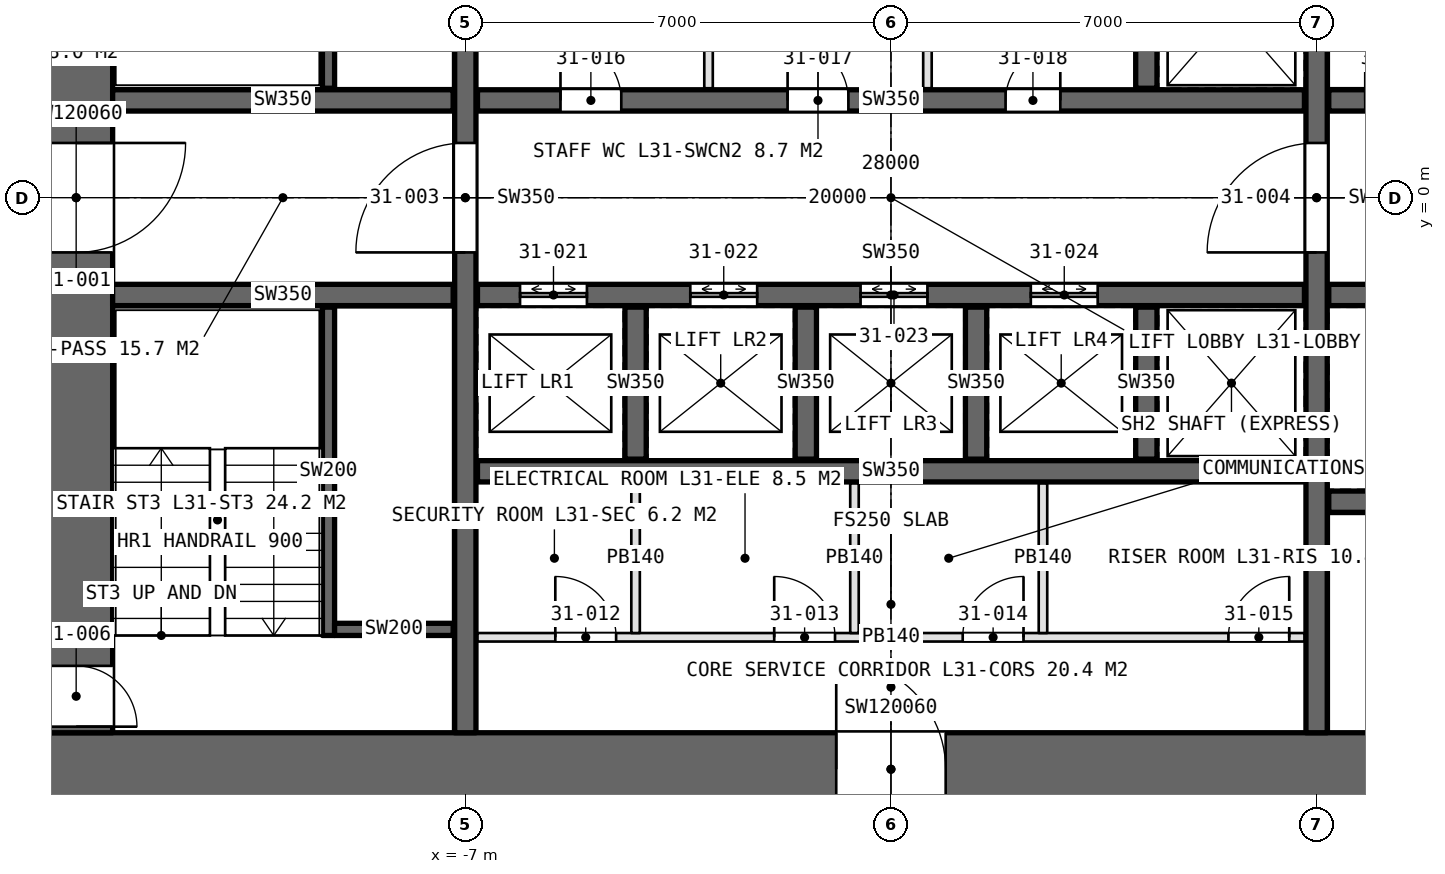
"""IFC4 building model, lengths in metres.
Left out: names, types, materials, properties, quantities, classifications, styles, units other than length and angle.
Written with IfcOpenShell. Run it as: python <this file> out.ifc"""

import sys

from ifc_helpers import new_model, si_unit, direction, frame, frame_2d, origin, place, context, subcontext, project, spatial, rectangle, extrude, element, fill, save


model = new_model("IFC4")
c1 = context("Model", 3, precision=1e-05, world=origin(), true_north=direction((0.0, 1.0)))
c2 = subcontext(c1, "Body", "Model", "MODEL_VIEW")
j1 = project(units=[si_unit("LENGTHUNIT", "METRE"), si_unit("PLANEANGLEUNIT", "RADIAN")], contexts=[c1])
p1 = place(None, origin())
s1 = spatial("IfcSite", under=j1, at=p1, CompositionType="ELEMENT")
p2 = place(p1, origin())
s2 = spatial("IfcBuilding", under=s1, at=p2, CompositionType="ELEMENT")
p3 = place(p2, frame((0.0, 0.0, 147.0)))
s3 = spatial("IfcBuildingStorey", under=s2, at=p3, CompositionType="ELEMENT", Elevation=147.0)
p4 = place(p3, frame((-14.0, -9.4, 0.0), z_axis=(0.0, 0.0, 1.0), x_axis=(1.0, 0.0, 0.0)))
e1 = element("IfcWall", 1, at=p4, inside=s3, PredefinedType="SHEAR", context=c2, shape_type="SweptSolid", body=[
    extrude(rectangle(XDim=28.0, YDim=1.2, at=frame_2d((14.0, 0.0))), origin(), (0.0, 0.0, 1.0), 4.2),
])
p5 = place(p4, frame((13.1, 0.0, 0.0)))
e2 = element("IfcOpeningElement", 2, at=p5, cuts=e1, PredefinedType="OPENING", context=c2, shape_type="SweptSolid", body=[
    extrude(rectangle(XDim=1.8, YDim=2.4, at=frame_2d((0.9, 1.2))), frame((0.0, 0.61, 0.0), z_axis=(0.0, -1.0, 0.0), x_axis=(1.0, 0.0, 0.0)), (0.0, 0.0, 1.0), 1.22),
])
p6 = place(p4, frame((22.9, 0.0, 0.0)))
e3 = element("IfcOpeningElement", 3, at=p6, cuts=e1, PredefinedType="OPENING", context=c2, shape_type="SweptSolid", body=[
    extrude(rectangle(XDim=2.2, YDim=2.7, at=frame_2d((1.1, 1.35))), frame((0.0, 0.61, 0.0), z_axis=(0.0, -1.0, 0.0), x_axis=(1.0, 0.0, 0.0)), (0.0, 0.0, 1.0), 1.22),
])
p7 = place(p3, frame((-13.4, 8.8, 0.0), z_axis=(0.0, 0.0, 1.0), x_axis=(0.0, -1.0, 0.0)))
e4 = element("IfcWall", 4, at=p7, inside=s3, PredefinedType="SHEAR", context=c2, shape_type="SweptSolid", body=[
    extrude(rectangle(XDim=17.6, YDim=1.2, at=frame_2d((8.8, 0.0))), origin(), (0.0, 0.0, 1.0), 4.2),
])
p8 = place(p7, frame((7.9, 0.0, 0.0)))
e5 = element("IfcOpeningElement", 5, at=p8, cuts=e4, PredefinedType="OPENING", context=c2, shape_type="SweptSolid", body=[
    extrude(rectangle(XDim=1.8, YDim=2.4, at=frame_2d((0.9, 1.2))), frame((0.0, 0.61, 0.0), z_axis=(0.0, -1.0, 0.0), x_axis=(1.0, 0.0, 0.0)), (0.0, 0.0, 1.0), 1.22),
])
p9 = place(p7, frame((16.5, 0.0, 0.0)))
e6 = element("IfcOpeningElement", 6, at=p9, cuts=e4, PredefinedType="OPENING", context=c2, shape_type="SweptSolid", body=[
    extrude(rectangle(XDim=1.0, YDim=2.4, at=frame_2d((0.5, 1.2))), frame((0.0, 0.61, 0.0), z_axis=(0.0, -1.0, 0.0), x_axis=(1.0, 0.0, 0.0)), (0.0, 0.0, 1.0), 1.22),
])
p10 = place(p3, frame((-7.0, -8.8, 0.0), z_axis=(0.0, 0.0, 1.0), x_axis=(0.0, 1.0, 0.0)))
e7 = element("IfcWall", 7, at=p10, inside=s3, PredefinedType="SHEAR", context=c2, shape_type="SweptSolid", body=[
    extrude(rectangle(XDim=17.6, YDim=0.35, at=frame_2d((8.8, 0.0))), origin(), (0.0, 0.0, 1.0), 4.2),
])
p11 = place(p10, frame((7.9, 0.0, 0.0)))
e8 = element("IfcOpeningElement", 8, at=p11, cuts=e7, PredefinedType="OPENING", context=c2, shape_type="SweptSolid", body=[
    extrude(rectangle(XDim=1.8, YDim=2.4, at=frame_2d((0.9, 1.2))), frame((0.0, 0.185, 0.0), z_axis=(0.0, -1.0, 0.0), x_axis=(1.0, 0.0, 0.0)), (0.0, 0.0, 1.0), 0.37),
])
p12 = place(p3, frame((7.0, -8.8, 0.0), z_axis=(0.0, 0.0, 1.0), x_axis=(0.0, 1.0, 0.0)))
e9 = element("IfcWall", 9, at=p12, inside=s3, PredefinedType="SHEAR", context=c2, shape_type="SweptSolid", body=[
    extrude(rectangle(XDim=17.6, YDim=0.35, at=frame_2d((8.8, 0.0))), origin(), (0.0, 0.0, 1.0), 4.2),
])
p13 = place(p12, frame((7.9, 0.0, 0.0)))
e10 = element("IfcOpeningElement", 10, at=p13, cuts=e9, PredefinedType="OPENING", context=c2, shape_type="SweptSolid", body=[
    extrude(rectangle(XDim=1.8, YDim=2.4, at=frame_2d((0.9, 1.2))), frame((0.0, 0.185, 0.0), z_axis=(0.0, -1.0, 0.0), x_axis=(1.0, 0.0, 0.0)), (0.0, 0.0, 1.0), 0.37),
])
p14 = place(p3, frame((-6.8, 1.6, 0.0), z_axis=(0.0, 0.0, 1.0), x_axis=(1.0, 0.0, 0.0)))
e11 = element("IfcWall", 11, at=p14, inside=s3, PredefinedType="SHEAR", context=c2, shape_type="SweptSolid", body=[
    extrude(rectangle(XDim=13.6, YDim=0.35, at=frame_2d((6.8, 0.0))), origin(), (0.0, 0.0, 1.0), 4.2),
])
p15 = place(p14, frame((1.365, 0.0, 0.0)))
e12 = element("IfcOpeningElement", 12, at=p15, cuts=e11, PredefinedType="OPENING", context=c2, shape_type="SweptSolid", body=[
    extrude(rectangle(XDim=1.0, YDim=2.4, at=frame_2d((0.5, 1.2))), frame((0.0, 0.185, 0.0), z_axis=(0.0, -1.0, 0.0), x_axis=(1.0, 0.0, 0.0)), (0.0, 0.0, 1.0), 0.37),
])
p16 = place(p14, frame((5.1, 0.0, 0.0)))
e13 = element("IfcOpeningElement", 13, at=p16, cuts=e11, PredefinedType="OPENING", context=c2, shape_type="SweptSolid", body=[
    extrude(rectangle(XDim=1.0, YDim=2.4, at=frame_2d((0.5, 1.2))), frame((0.0, 0.185, 0.0), z_axis=(0.0, -1.0, 0.0), x_axis=(1.0, 0.0, 0.0)), (0.0, 0.0, 1.0), 0.37),
])
p17 = place(p14, frame((8.685, 0.0, 0.0)))
e14 = element("IfcOpeningElement", 14, at=p17, cuts=e11, PredefinedType="OPENING", context=c2, shape_type="SweptSolid", body=[
    extrude(rectangle(XDim=0.9, YDim=2.4, at=frame_2d((0.45, 1.2))), frame((0.0, 0.185, 0.0), z_axis=(0.0, -1.0, 0.0), x_axis=(1.0, 0.0, 0.0)), (0.0, 0.0, 1.0), 0.37),
])
p18 = place(p3, frame((-6.8, -1.6, 0.0), z_axis=(0.0, 0.0, 1.0), x_axis=(1.0, 0.0, 0.0)))
e15 = element("IfcWall", 15, at=p18, inside=s3, PredefinedType="SHEAR", context=c2, shape_type="SweptSolid", body=[
    extrude(rectangle(XDim=13.6, YDim=0.35, at=frame_2d((6.8, 0.0))), origin(), (0.0, 0.0, 1.0), 4.2),
])
p19 = place(p18, frame((0.7, 0.0, 0.0)))
e16 = element("IfcOpeningElement", 16, at=p19, cuts=e15, PredefinedType="OPENING", context=c2, shape_type="SweptSolid", body=[
    extrude(rectangle(XDim=1.1, YDim=2.4, at=frame_2d((0.55, 1.2))), frame((0.0, 0.185, 0.0), z_axis=(0.0, -1.0, 0.0), x_axis=(1.0, 0.0, 0.0)), (0.0, 0.0, 1.0), 0.37),
])
p20 = place(p18, frame((3.5, 0.0, 0.0)))
e17 = element("IfcOpeningElement", 17, at=p20, cuts=e15, PredefinedType="OPENING", context=c2, shape_type="SweptSolid", body=[
    extrude(rectangle(XDim=1.1, YDim=2.4, at=frame_2d((0.55, 1.2))), frame((0.0, 0.185, 0.0), z_axis=(0.0, -1.0, 0.0), x_axis=(1.0, 0.0, 0.0)), (0.0, 0.0, 1.0), 0.37),
])
p21 = place(p18, frame((6.3, 0.0, 0.0)))
e18 = element("IfcOpeningElement", 18, at=p21, cuts=e15, PredefinedType="OPENING", context=c2, shape_type="SweptSolid", body=[
    extrude(rectangle(XDim=1.1, YDim=2.4, at=frame_2d((0.55, 1.2))), frame((0.0, 0.185, 0.0), z_axis=(0.0, -1.0, 0.0), x_axis=(1.0, 0.0, 0.0)), (0.0, 0.0, 1.0), 0.37),
])
p22 = place(p18, frame((9.1, 0.0, 0.0)))
e19 = element("IfcOpeningElement", 19, at=p22, cuts=e15, PredefinedType="OPENING", context=c2, shape_type="SweptSolid", body=[
    extrude(rectangle(XDim=1.1, YDim=2.4, at=frame_2d((0.55, 1.2))), frame((0.0, 0.185, 0.0), z_axis=(0.0, -1.0, 0.0), x_axis=(1.0, 0.0, 0.0)), (0.0, 0.0, 1.0), 0.37),
])
p23 = place(p3, frame((-6.8, -4.5, 0.0), z_axis=(0.0, 0.0, 1.0), x_axis=(1.0, 0.0, 0.0)))
e20 = element("IfcWall", 20, at=p23, inside=s3, PredefinedType="SHEAR", context=c2, shape_type="SweptSolid", body=[
    extrude(rectangle(XDim=13.6, YDim=0.35, at=frame_2d((6.8, 0.0))), origin(), (0.0, 0.0, 1.0), 4.2),
])
for number, where, z_axis, x_axis in (
    (21, (-12.8, 1.6, 0.0), (0.0, 0.0, 1.0), (1.0, 0.0, 0.0)),
    (22, (-12.8, -1.6, 0.0), (0.0, 0.0, 1.0), (1.0, 0.0, 0.0)),
):
    element("IfcWall", number, at=place(p3, frame(where, z_axis=z_axis, x_axis=x_axis)), inside=s3, PredefinedType="SHEAR", context=c2, shape_type="SweptSolid", body=[
        extrude(rectangle(XDim=5.6, YDim=0.35, at=frame_2d((2.8, 0.0))), origin(), (0.0, 0.0, 1.0), 4.2),
    ])
p24 = place(p3, frame((7.2, 1.6, 0.0), z_axis=(0.0, 0.0, 1.0), x_axis=(1.0, 0.0, 0.0)))
e23 = element("IfcWall", 23, at=p24, inside=s3, PredefinedType="SHEAR", context=c2, shape_type="SweptSolid", body=[
    extrude(rectangle(XDim=5.6, YDim=0.35, at=frame_2d((2.8, 0.0))), origin(), (0.0, 0.0, 1.0), 4.2),
])
p25 = place(p24, frame((0.6, 0.0, 0.0)))
e24 = element("IfcOpeningElement", 24, at=p25, cuts=e23, PredefinedType="OPENING", context=c2, shape_type="SweptSolid", body=[
    extrude(rectangle(XDim=1.0, YDim=2.4, at=frame_2d((0.5, 1.2))), frame((0.0, 0.185, 0.0), z_axis=(0.0, -1.0, 0.0), x_axis=(1.0, 0.0, 0.0)), (0.0, 0.0, 1.0), 0.37),
])
p26 = place(p3, frame((7.2, -1.6, 0.0), z_axis=(0.0, 0.0, 1.0), x_axis=(1.0, 0.0, 0.0)))
e25 = element("IfcWall", 25, at=p26, inside=s3, PredefinedType="SHEAR", context=c2, shape_type="SweptSolid", body=[
    extrude(rectangle(XDim=5.6, YDim=0.35, at=frame_2d((2.8, 0.0))), origin(), (0.0, 0.0, 1.0), 4.2),
])
p27 = place(p26, frame((0.9, 0.0, 0.0)))
e26 = element("IfcOpeningElement", 26, at=p27, cuts=e25, PredefinedType="OPENING", context=c2, shape_type="SweptSolid", body=[
    extrude(rectangle(XDim=1.3, YDim=2.4, at=frame_2d((0.65, 1.2))), frame((0.0, 0.185, 0.0), z_axis=(0.0, -1.0, 0.0), x_axis=(1.0, 0.0, 0.0)), (0.0, 0.0, 1.0), 0.37),
])
p28 = place(p26, frame((3.9, 0.0, 0.0)))
e27 = element("IfcOpeningElement", 27, at=p28, cuts=e25, PredefinedType="OPENING", context=c2, shape_type="SweptSolid", body=[
    extrude(rectangle(XDim=1.3, YDim=2.4, at=frame_2d((0.65, 1.2))), frame((0.0, 0.185, 0.0), z_axis=(0.0, -1.0, 0.0), x_axis=(1.0, 0.0, 0.0)), (0.0, 0.0, 1.0), 0.37),
])
p29 = place(p3, frame((7.2, -5.0, 0.0), z_axis=(0.0, 0.0, 1.0), x_axis=(1.0, 0.0, 0.0)))
e28 = element("IfcWall", 28, at=p29, inside=s3, PredefinedType="SHEAR", context=c2, shape_type="SweptSolid", body=[
    extrude(rectangle(XDim=5.6, YDim=0.35, at=frame_2d((2.8, 0.0))), origin(), (0.0, 0.0, 1.0), 4.2),
])
for number, where, z_axis, x_axis in (
    (29, (-4.2, -4.3, 0.0), (0.0, 0.0, 1.0), (0.0, 1.0, 0.0)),
    (30, (-1.4, -4.3, 0.0), (0.0, 0.0, 1.0), (0.0, 1.0, 0.0)),
    (31, (1.4, -4.3, 0.0), (0.0, 0.0, 1.0), (0.0, 1.0, 0.0)),
    (32, (4.2, 1.8, 0.0), (0.0, 0.0, 1.0), (0.0, 1.0, 0.0)),
    (33, (4.2, -4.3, 0.0), (0.0, 0.0, 1.0), (0.0, 1.0, 0.0)),
):
    element("IfcWall", number, at=place(p3, frame(where, z_axis=z_axis, x_axis=x_axis)), inside=s3, PredefinedType="SHEAR", context=c2, shape_type="SweptSolid", body=[
        extrude(rectangle(XDim=2.5, YDim=0.35, at=frame_2d((1.25, 0.0))), origin(), (0.0, 0.0, 1.0), 4.2),
    ])
p30 = place(p3, frame((-6.8, -7.23, 0.0), z_axis=(0.0, 0.0, 1.0), x_axis=(1.0, 0.0, 0.0)))
e34 = element("IfcWall", 34, at=p30, inside=s3, PredefinedType="PARTITIONING", context=c2, shape_type="SweptSolid", body=[
    extrude(rectangle(XDim=13.6, YDim=0.14, at=frame_2d((6.8, 0.0))), origin(), (0.0, 0.0, 1.0), 3.95),
])
p31 = place(p30, frame((1.28, 0.0, 0.0)))
e35 = element("IfcOpeningElement", 35, at=p31, cuts=e34, PredefinedType="OPENING", context=c2, shape_type="SweptSolid", body=[
    extrude(rectangle(XDim=1.0, YDim=2.4, at=frame_2d((0.5, 1.2))), frame((0.0, 0.08, 0.0), z_axis=(0.0, -1.0, 0.0), x_axis=(1.0, 0.0, 0.0)), (0.0, 0.0, 1.0), 0.16),
])
p32 = place(p30, frame((4.88, 0.0, 0.0)))
e36 = element("IfcOpeningElement", 36, at=p32, cuts=e34, PredefinedType="OPENING", context=c2, shape_type="SweptSolid", body=[
    extrude(rectangle(XDim=1.0, YDim=2.4, at=frame_2d((0.5, 1.2))), frame((0.0, 0.08, 0.0), z_axis=(0.0, -1.0, 0.0), x_axis=(1.0, 0.0, 0.0)), (0.0, 0.0, 1.0), 0.16),
])
p33 = place(p30, frame((7.98, 0.0, 0.0)))
e37 = element("IfcOpeningElement", 37, at=p33, cuts=e34, PredefinedType="OPENING", context=c2, shape_type="SweptSolid", body=[
    extrude(rectangle(XDim=1.0, YDim=2.4, at=frame_2d((0.5, 1.2))), frame((0.0, 0.08, 0.0), z_axis=(0.0, -1.0, 0.0), x_axis=(1.0, 0.0, 0.0)), (0.0, 0.0, 1.0), 0.16),
])
p34 = place(p30, frame((12.35, 0.0, 0.0)))
e38 = element("IfcOpeningElement", 38, at=p34, cuts=e34, PredefinedType="OPENING", context=c2, shape_type="SweptSolid", body=[
    extrude(rectangle(XDim=1.0, YDim=2.4, at=frame_2d((0.5, 1.2))), frame((0.0, 0.08, 0.0), z_axis=(0.0, -1.0, 0.0), x_axis=(1.0, 0.0, 0.0)), (0.0, 0.0, 1.0), 0.16),
])
for number, where, z_axis, x_axis in (
    (39, (-4.2, -4.7, 0.0), (0.0, 0.0, 1.0), (0.0, -1.0, 0.0)),
    (40, (-0.6, -4.7, 0.0), (0.0, 0.0, 1.0), (0.0, -1.0, 0.0)),
    (41, (2.5, -4.7, 0.0), (0.0, 0.0, 1.0), (0.0, -1.0, 0.0)),
):
    element("IfcWall", number, at=place(p3, frame(where, z_axis=z_axis, x_axis=x_axis)), inside=s3, PredefinedType="PARTITIONING", context=c2, shape_type="SweptSolid", body=[
        extrude(rectangle(XDim=2.46, YDim=0.14, at=frame_2d((1.23, 0.0))), origin(), (0.0, 0.0, 1.0), 3.95),
    ])
for number, where, z_axis, x_axis in (
    (42, (-3.0, 1.8, 0.0), (0.0, 0.0, 1.0), (0.0, 1.0, 0.0)),
    (43, (0.6, 1.8, 0.0), (0.0, 0.0, 1.0), (0.0, 1.0, 0.0)),
):
    element("IfcWall", number, at=place(p3, frame(where, z_axis=z_axis, x_axis=x_axis)), inside=s3, PredefinedType="PARTITIONING", context=c2, shape_type="SweptSolid", body=[
        extrude(rectangle(XDim=2.5, YDim=0.14, at=frame_2d((1.25, 0.0))), origin(), (0.0, 0.0, 1.0), 3.95),
    ])
for number, where, z_axis, x_axis in (
    (44, (-9.25, 7.2, 0.0), (0.0, 0.0, 1.0), (0.0, -1.0, 0.0)),
    (45, (-9.25, -7.2, 0.0), (0.0, 0.0, 1.0), (0.0, 1.0, 0.0)),
):
    element("IfcWall", number, at=place(p3, frame(where, z_axis=z_axis, x_axis=x_axis)), inside=s3, PredefinedType="SOLIDWALL", context=c2, shape_type="SweptSolid", body=[
        extrude(rectangle(XDim=5.4, YDim=0.2, at=frame_2d((2.7, 0.0))), origin(), (0.0, 0.0, 1.0), 4.2),
    ])
p35 = place(p3, frame((-9.15, -7.1, 0.0), z_axis=(0.0, 0.0, 1.0), x_axis=(1.0, 0.0, 0.0)))
e46 = element("IfcWall", 46, at=p35, inside=s3, PredefinedType="SOLIDWALL", context=c2, shape_type="SweptSolid", body=[
    extrude(rectangle(XDim=1.95, YDim=0.2, at=frame_2d((0.975, 0.0))), origin(), (0.0, 0.0, 1.0), 4.2),
])
p36 = place(p8, origin())
e47 = element("IfcDoor", 47, at=p36, inside=s3, OperationType="DOUBLE_DOOR_SINGLE_SWING", PredefinedType="DOOR", context=c2, shape_type="SweptSolid", body=[
    extrude(rectangle(XDim=1.8, YDim=2.4, at=frame_2d((0.9, 1.2))), frame((0.0, 0.025, 0.0), z_axis=(0.0, -1.0, 0.0), x_axis=(1.0, 0.0, 0.0)), (0.0, 0.0, 1.0), 0.05),
])
fill(e5, e47)
p37 = place(p11, origin())
e48 = element("IfcDoor", 48, at=p37, inside=s3, OperationType="DOUBLE_DOOR_SINGLE_SWING", PredefinedType="DOOR", context=c2, shape_type="SweptSolid", body=[
    extrude(rectangle(XDim=1.8, YDim=2.4, at=frame_2d((0.9, 1.2))), frame((0.0, 0.025, 0.0), z_axis=(0.0, -1.0, 0.0), x_axis=(1.0, 0.0, 0.0)), (0.0, 0.0, 1.0), 0.05),
])
fill(e8, e48)
p38 = place(p13, origin())
e49 = element("IfcDoor", 49, at=p38, inside=s3, OperationType="DOUBLE_DOOR_SINGLE_SWING", PredefinedType="DOOR", context=c2, shape_type="SweptSolid", body=[
    extrude(rectangle(XDim=1.8, YDim=2.4, at=frame_2d((0.9, 1.2))), frame((0.0, 0.025, 0.0), z_axis=(0.0, -1.0, 0.0), x_axis=(1.0, 0.0, 0.0)), (0.0, 0.0, 1.0), 0.05),
])
fill(e10, e49)
p39 = place(p9, origin())
e50 = element("IfcDoor", 50, at=p39, inside=s3, OperationType="SINGLE_SWING_RIGHT", PredefinedType="DOOR", context=c2, shape_type="SweptSolid", body=[
    extrude(rectangle(XDim=1.0, YDim=2.4, at=frame_2d((0.5, 1.2))), frame((0.0, 0.025, 0.0), z_axis=(0.0, -1.0, 0.0), x_axis=(1.0, 0.0, 0.0)), (0.0, 0.0, 1.0), 0.05),
])
fill(e6, e50)
p40 = place(p31, origin())
e51 = element("IfcDoor", 51, at=p40, inside=s3, OperationType="SINGLE_SWING_LEFT", PredefinedType="DOOR", context=c2, shape_type="SweptSolid", body=[
    extrude(rectangle(XDim=1.0, YDim=2.4, at=frame_2d((0.5, 1.2))), frame((0.0, 0.025, 0.0), z_axis=(0.0, -1.0, 0.0), x_axis=(1.0, 0.0, 0.0)), (0.0, 0.0, 1.0), 0.05),
])
fill(e35, e51)
p41 = place(p32, origin())
e52 = element("IfcDoor", 52, at=p41, inside=s3, OperationType="SINGLE_SWING_LEFT", PredefinedType="DOOR", context=c2, shape_type="SweptSolid", body=[
    extrude(rectangle(XDim=1.0, YDim=2.4, at=frame_2d((0.5, 1.2))), frame((0.0, 0.025, 0.0), z_axis=(0.0, -1.0, 0.0), x_axis=(1.0, 0.0, 0.0)), (0.0, 0.0, 1.0), 0.05),
])
fill(e36, e52)
p42 = place(p33, origin())
e53 = element("IfcDoor", 53, at=p42, inside=s3, OperationType="SINGLE_SWING_RIGHT", PredefinedType="DOOR", context=c2, shape_type="SweptSolid", body=[
    extrude(rectangle(XDim=1.0, YDim=2.4, at=frame_2d((0.5, 1.2))), frame((0.0, 0.025, 0.0), z_axis=(0.0, -1.0, 0.0), x_axis=(1.0, 0.0, 0.0)), (0.0, 0.0, 1.0), 0.05),
])
fill(e37, e53)
p43 = place(p34, origin())
e54 = element("IfcDoor", 54, at=p43, inside=s3, OperationType="SINGLE_SWING_RIGHT", PredefinedType="DOOR", context=c2, shape_type="SweptSolid", body=[
    extrude(rectangle(XDim=1.0, YDim=2.4, at=frame_2d((0.5, 1.2))), frame((0.0, 0.025, 0.0), z_axis=(0.0, -1.0, 0.0), x_axis=(1.0, 0.0, 0.0)), (0.0, 0.0, 1.0), 0.05),
])
fill(e38, e54)
p44 = place(p15, origin())
e55 = element("IfcDoor", 55, at=p44, inside=s3, OperationType="SINGLE_SWING_LEFT", PredefinedType="DOOR", context=c2, shape_type="SweptSolid", body=[
    extrude(rectangle(XDim=1.0, YDim=2.4, at=frame_2d((0.5, 1.2))), frame((0.0, 0.025, 0.0), z_axis=(0.0, -1.0, 0.0), x_axis=(1.0, 0.0, 0.0)), (0.0, 0.0, 1.0), 0.05),
])
fill(e12, e55)
p45 = place(p16, origin())
e56 = element("IfcDoor", 56, at=p45, inside=s3, OperationType="SINGLE_SWING_LEFT", PredefinedType="DOOR", context=c2, shape_type="SweptSolid", body=[
    extrude(rectangle(XDim=1.0, YDim=2.4, at=frame_2d((0.5, 1.2))), frame((0.0, 0.025, 0.0), z_axis=(0.0, -1.0, 0.0), x_axis=(1.0, 0.0, 0.0)), (0.0, 0.0, 1.0), 0.05),
])
fill(e13, e56)
p46 = place(p17, origin())
e57 = element("IfcDoor", 57, at=p46, inside=s3, OperationType="SINGLE_SWING_RIGHT", PredefinedType="DOOR", context=c2, shape_type="SweptSolid", body=[
    extrude(rectangle(XDim=0.9, YDim=2.4, at=frame_2d((0.45, 1.2))), frame((0.0, 0.025, 0.0), z_axis=(0.0, -1.0, 0.0), x_axis=(1.0, 0.0, 0.0)), (0.0, 0.0, 1.0), 0.05),
])
fill(e14, e57)
p47 = place(p5, origin())
e58 = element("IfcDoor", 58, at=p47, inside=s3, OperationType="DOUBLE_DOOR_SINGLE_SWING", PredefinedType="DOOR", context=c2, shape_type="SweptSolid", body=[
    extrude(rectangle(XDim=1.8, YDim=2.4, at=frame_2d((0.9, 1.2))), frame((0.0, 0.025, 0.0), z_axis=(0.0, -1.0, 0.0), x_axis=(1.0, 0.0, 0.0)), (0.0, 0.0, 1.0), 0.05),
])
fill(e2, e58)
p48 = place(p19, origin())
e59 = element("IfcDoor", 59, at=p48, inside=s3, OperationType="DOUBLE_DOOR_SLIDING", PredefinedType="DOOR", context=c2, shape_type="SweptSolid", body=[
    extrude(rectangle(XDim=1.1, YDim=2.4, at=frame_2d((0.55, 1.2))), frame((0.0, 0.025, 0.0), z_axis=(0.0, -1.0, 0.0), x_axis=(1.0, 0.0, 0.0)), (0.0, 0.0, 1.0), 0.05),
])
fill(e16, e59)
p49 = place(p20, origin())
e60 = element("IfcDoor", 60, at=p49, inside=s3, OperationType="DOUBLE_DOOR_SLIDING", PredefinedType="DOOR", context=c2, shape_type="SweptSolid", body=[
    extrude(rectangle(XDim=1.1, YDim=2.4, at=frame_2d((0.55, 1.2))), frame((0.0, 0.025, 0.0), z_axis=(0.0, -1.0, 0.0), x_axis=(1.0, 0.0, 0.0)), (0.0, 0.0, 1.0), 0.05),
])
fill(e17, e60)
p50 = place(p21, origin())
e61 = element("IfcDoor", 61, at=p50, inside=s3, OperationType="DOUBLE_DOOR_SLIDING", PredefinedType="DOOR", context=c2, shape_type="SweptSolid", body=[
    extrude(rectangle(XDim=1.1, YDim=2.4, at=frame_2d((0.55, 1.2))), frame((0.0, 0.025, 0.0), z_axis=(0.0, -1.0, 0.0), x_axis=(1.0, 0.0, 0.0)), (0.0, 0.0, 1.0), 0.05),
])
fill(e18, e61)
p51 = place(p22, origin())
e62 = element("IfcDoor", 62, at=p51, inside=s3, OperationType="DOUBLE_DOOR_SLIDING", PredefinedType="DOOR", context=c2, shape_type="SweptSolid", body=[
    extrude(rectangle(XDim=1.1, YDim=2.4, at=frame_2d((0.55, 1.2))), frame((0.0, 0.025, 0.0), z_axis=(0.0, -1.0, 0.0), x_axis=(1.0, 0.0, 0.0)), (0.0, 0.0, 1.0), 0.05),
])
fill(e19, e62)
save(model, sys.argv[1])
